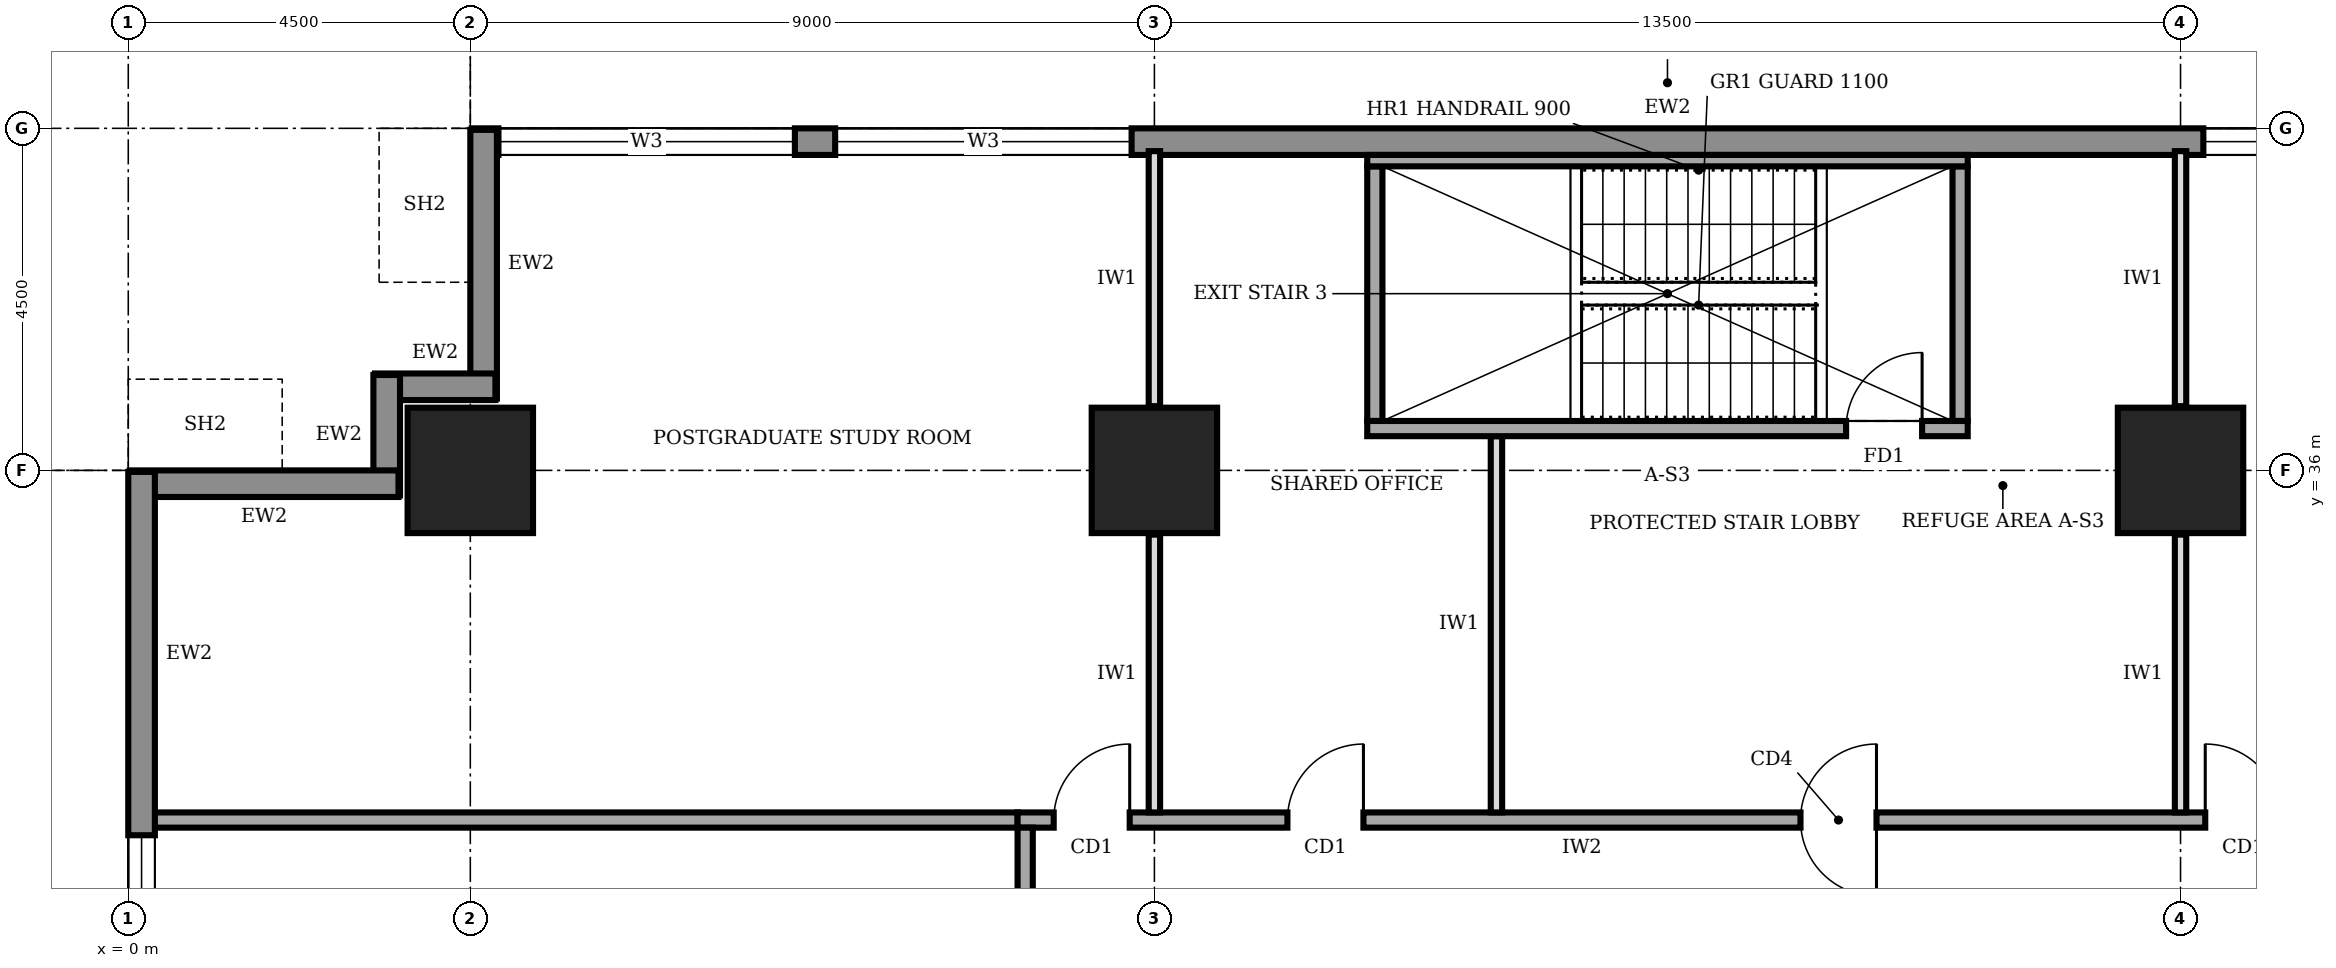
"""IFC4 building model, lengths in metres.
Left out: names, types, materials, properties, quantities, classifications, styles, units other than length and angle.
Written with IfcOpenShell. Run it as: python <this file> out.ifc"""

import sys

from ifc_helpers import new_model, si_unit, direction, frame, frame_2d, origin, origin_2d, place, context, subcontext, project, spatial, rectangle, extrude, element, fill, save


model = new_model("IFC4")
c1 = context("Model", 3, precision=1e-05, world=origin(), true_north=direction((0.0, 1.0)))
c2 = subcontext(c1, "Body", "Model", "MODEL_VIEW")
j1 = project(units=[si_unit("LENGTHUNIT", "METRE"), si_unit("PLANEANGLEUNIT", "RADIAN")], contexts=[c1])
p1 = place(None, origin())
s1 = spatial("IfcSite", under=j1, at=p1, CompositionType="ELEMENT")
p2 = place(p1, origin())
s2 = spatial("IfcBuilding", under=s1, at=p2, CompositionType="ELEMENT")
p3 = place(p2, frame((0.0, 0.0, 181.0)))
s3 = spatial("IfcBuildingStorey", under=s2, at=p3, CompositionType="ELEMENT", Elevation=181.0)
for number, where, z_axis, x_axis in (
    (1, (4.5, 36.0, 0.0), (0.0, 0.0, 1.0), (1.0, 0.0, 0.0)),
    (2, (13.5, 36.0, 0.0), (0.0, 0.0, 1.0), (1.0, 0.0, 0.0)),
    (3, (27.0, 36.0, 0.0), (0.0, 0.0, 1.0), (1.0, 0.0, 0.0)),
):
    element("IfcColumn", number, at=place(p3, frame(where, z_axis=z_axis, x_axis=x_axis)), inside=s3, PredefinedType="COLUMN", context=c2, shape_type="SweptSolid", body=[
        extrude(rectangle(XDim=1.65, YDim=1.65, at=origin_2d()), origin(), (0.0, 0.0, 1.0), 4.0),
    ])
p4 = place(p3, frame((35.98, 40.325, 0.0), z_axis=(0.0, 0.0, 1.0), x_axis=(-1.0, 0.0, 0.0)))
e4 = element("IfcWall", 4, at=p4, inside=s3, PredefinedType="STANDARD", context=c2, shape_type="SweptSolid", body=[
    extrude(rectangle(XDim=31.46, YDim=0.35, at=frame_2d((15.73, 0.0))), origin(), (0.0, 0.0, 1.0), 3.75),
])
p5 = place(p4, frame((27.21, 0.0, 0.95)))
e5 = element("IfcOpeningElement", 5, at=p5, cuts=e4, PredefinedType="OPENING", context=c2, shape_type="SweptSolid", body=[
    extrude(rectangle(XDim=3.9, YDim=1.8, at=frame_2d((1.95, 0.9))), frame((0.0, 0.185, 0.0), z_axis=(0.0, -1.0, 0.0), x_axis=(1.0, 0.0, 0.0)), (0.0, 0.0, 1.0), 0.37),
])
p6 = place(p4, frame((22.78, 0.0, 0.95)))
e6 = element("IfcOpeningElement", 6, at=p6, cuts=e4, PredefinedType="OPENING", context=c2, shape_type="SweptSolid", body=[
    extrude(rectangle(XDim=3.9, YDim=1.8, at=frame_2d((1.95, 0.9))), frame((0.0, 0.185, 0.0), z_axis=(0.0, -1.0, 0.0), x_axis=(1.0, 0.0, 0.0)), (0.0, 0.0, 1.0), 0.37),
])
p7 = place(p4, frame((4.78, 0.0, 0.95)))
e7 = element("IfcOpeningElement", 7, at=p7, cuts=e4, PredefinedType="OPENING", context=c2, shape_type="SweptSolid", body=[
    extrude(rectangle(XDim=3.9, YDim=1.8, at=frame_2d((1.95, 0.9))), frame((0.0, 0.185, 0.0), z_axis=(0.0, -1.0, 0.0), x_axis=(1.0, 0.0, 0.0)), (0.0, 0.0, 1.0), 0.37),
])
p8 = place(p3, frame((4.675, 40.48, 0.0), z_axis=(0.0, 0.0, 1.0), x_axis=(0.0, -1.0, 0.0)))
e8 = element("IfcWall", 8, at=p8, inside=s3, PredefinedType="STANDARD", context=c2, shape_type="SweptSolid", body=[
    extrude(rectangle(XDim=3.535, YDim=0.35, at=frame_2d((1.768, 0.0))), origin(), (0.0, 0.0, 1.0), 2.85),
])
for number, where, z_axis, x_axis in (
    (9, (4.83, 37.1, 0.0), (0.0, 0.0, 1.0), (-1.0, 0.0, 0.0)),
    (10, (3.4, 37.255, 0.0), (0.0, 0.0, 1.0), (0.0, -1.0, 0.0)),
):
    element("IfcWall", number, at=place(p3, frame(where, z_axis=z_axis, x_axis=x_axis)), inside=s3, PredefinedType="STANDARD", context=c2, shape_type="SweptSolid", body=[
        extrude(rectangle(XDim=1.585, YDim=0.35, at=frame_2d((0.792, 0.0))), origin(), (0.0, 0.0, 1.0), 3.75),
    ])
p9 = place(p3, frame((3.555, 35.825, 0.0), z_axis=(0.0, 0.0, 1.0), x_axis=(-1.0, 0.0, 0.0)))
e11 = element("IfcWall", 11, at=p9, inside=s3, PredefinedType="STANDARD", context=c2, shape_type="SweptSolid", body=[
    extrude(rectangle(XDim=3.535, YDim=0.35, at=frame_2d((1.768, 0.0))), origin(), (0.0, 0.0, 1.0), 2.85),
])
p10 = place(p3, frame((0.175, 35.98, 0.0), z_axis=(0.0, 0.0, 1.0), x_axis=(0.0, -1.0, 0.0)))
e12 = element("IfcWall", 12, at=p10, inside=s3, PredefinedType="STANDARD", context=c2, shape_type="SweptSolid", body=[
    extrude(rectangle(XDim=31.46, YDim=0.35, at=frame_2d((15.73, 0.0))), origin(), (0.0, 0.0, 1.0), 3.75),
])
p11 = place(p10, frame((27.21, 0.0, 0.95)))
e13 = element("IfcOpeningElement", 13, at=p11, cuts=e12, PredefinedType="OPENING", context=c2, shape_type="SweptSolid", body=[
    extrude(rectangle(XDim=3.9, YDim=1.8, at=frame_2d((1.95, 0.9))), frame((0.0, 0.185, 0.0), z_axis=(0.0, -1.0, 0.0), x_axis=(1.0, 0.0, 0.0)), (0.0, 0.0, 1.0), 0.37),
])
p12 = place(p10, frame((22.78, 0.0, 0.95)))
e14 = element("IfcOpeningElement", 14, at=p12, cuts=e12, PredefinedType="OPENING", context=c2, shape_type="SweptSolid", body=[
    extrude(rectangle(XDim=3.9, YDim=1.8, at=frame_2d((1.95, 0.9))), frame((0.0, 0.185, 0.0), z_axis=(0.0, -1.0, 0.0), x_axis=(1.0, 0.0, 0.0)), (0.0, 0.0, 1.0), 0.37),
])
p13 = place(p10, frame((18.28, 0.0, 0.95)))
e15 = element("IfcOpeningElement", 15, at=p13, cuts=e12, PredefinedType="OPENING", context=c2, shape_type="SweptSolid", body=[
    extrude(rectangle(XDim=3.9, YDim=1.8, at=frame_2d((1.95, 0.9))), frame((0.0, 0.185, 0.0), z_axis=(0.0, -1.0, 0.0), x_axis=(1.0, 0.0, 0.0)), (0.0, 0.0, 1.0), 0.37),
])
p14 = place(p10, frame((13.78, 0.0, 0.95)))
e16 = element("IfcOpeningElement", 16, at=p14, cuts=e12, PredefinedType="OPENING", context=c2, shape_type="SweptSolid", body=[
    extrude(rectangle(XDim=3.9, YDim=1.8, at=frame_2d((1.95, 0.9))), frame((0.0, 0.185, 0.0), z_axis=(0.0, -1.0, 0.0), x_axis=(1.0, 0.0, 0.0)), (0.0, 0.0, 1.0), 0.37),
])
p15 = place(p10, frame((9.28, 0.0, 0.95)))
e17 = element("IfcOpeningElement", 17, at=p15, cuts=e12, PredefinedType="OPENING", context=c2, shape_type="SweptSolid", body=[
    extrude(rectangle(XDim=3.9, YDim=1.8, at=frame_2d((1.95, 0.9))), frame((0.0, 0.185, 0.0), z_axis=(0.0, -1.0, 0.0), x_axis=(1.0, 0.0, 0.0)), (0.0, 0.0, 1.0), 0.37),
])
p16 = place(p10, frame((4.78, 0.0, 0.95)))
e18 = element("IfcOpeningElement", 18, at=p16, cuts=e12, PredefinedType="OPENING", context=c2, shape_type="SweptSolid", body=[
    extrude(rectangle(XDim=3.9, YDim=1.8, at=frame_2d((1.95, 0.9))), frame((0.0, 0.185, 0.0), z_axis=(0.0, -1.0, 0.0), x_axis=(1.0, 0.0, 0.0)), (0.0, 0.0, 1.0), 0.37),
])
p17 = place(p3, frame((28.6, 31.4, 0.0), z_axis=(0.0, 0.0, 1.0), x_axis=(-1.0, 0.0, 0.0)))
e19 = element("IfcWall", 19, at=p17, inside=s3, PredefinedType="SOLIDWALL", context=c2, shape_type="SweptSolid", body=[
    extrude(rectangle(XDim=16.9, YDim=0.2, at=frame_2d((8.45, 0.0))), origin(), (0.0, 0.0, 1.0), 3.75),
])
p18 = place(p17, frame((15.425, 0.0, 0.0)))
e20 = element("IfcOpeningElement", 20, at=p18, cuts=e19, PredefinedType="OPENING", context=c2, shape_type="SweptSolid", body=[
    extrude(rectangle(XDim=1.0, YDim=2.1, at=frame_2d((0.5, 1.05))), frame((0.0, 0.11, 0.0), z_axis=(0.0, -1.0, 0.0), x_axis=(1.0, 0.0, 0.0)), (0.0, 0.0, 1.0), 0.22),
])
p19 = place(p17, frame((12.35, 0.0, 0.0)))
e21 = element("IfcOpeningElement", 21, at=p19, cuts=e19, PredefinedType="OPENING", context=c2, shape_type="SweptSolid", body=[
    extrude(rectangle(XDim=1.0, YDim=2.1, at=frame_2d((0.5, 1.05))), frame((0.0, 0.11, 0.0), z_axis=(0.0, -1.0, 0.0), x_axis=(1.0, 0.0, 0.0)), (0.0, 0.0, 1.0), 0.22),
])
p20 = place(p17, frame((5.6, 0.0, 0.0)))
e22 = element("IfcOpeningElement", 22, at=p20, cuts=e19, PredefinedType="OPENING", context=c2, shape_type="SweptSolid", body=[
    extrude(rectangle(XDim=1.0, YDim=2.1, at=frame_2d((0.5, 1.05))), frame((0.0, 0.11, 0.0), z_axis=(0.0, -1.0, 0.0), x_axis=(1.0, 0.0, 0.0)), (0.0, 0.0, 1.0), 0.22),
])
p21 = place(p17, frame((0.275, 0.0, 0.0)))
e23 = element("IfcOpeningElement", 23, at=p21, cuts=e19, PredefinedType="OPENING", context=c2, shape_type="SweptSolid", body=[
    extrude(rectangle(XDim=1.0, YDim=2.1, at=frame_2d((0.5, 1.05))), frame((0.0, 0.11, 0.0), z_axis=(0.0, -1.0, 0.0), x_axis=(1.0, 0.0, 0.0)), (0.0, 0.0, 1.0), 0.22),
])
p22 = place(p3, frame((11.8, 31.3, 0.0), z_axis=(0.0, 0.0, 1.0), x_axis=(0.0, -1.0, 0.0)))
e24 = element("IfcWall", 24, at=p22, inside=s3, PredefinedType="SOLIDWALL", context=c2, shape_type="SweptSolid", body=[
    extrude(rectangle(XDim=22.3, YDim=0.2, at=frame_2d((11.15, 0.0))), origin(), (0.0, 0.0, 1.0), 3.75),
])
p23 = place(p22, frame((19.55, 0.0, 0.0)))
e25 = element("IfcOpeningElement", 25, at=p23, cuts=e24, PredefinedType="OPENING", context=c2, shape_type="SweptSolid", body=[
    extrude(rectangle(XDim=1.0, YDim=2.1, at=frame_2d((0.5, 1.05))), frame((0.0, 0.11, 0.0), z_axis=(0.0, -1.0, 0.0), x_axis=(1.0, 0.0, 0.0)), (0.0, 0.0, 1.0), 0.22),
])
p24 = place(p22, frame((16.15, 0.0, 0.0)))
e26 = element("IfcOpeningElement", 26, at=p24, cuts=e24, PredefinedType="OPENING", context=c2, shape_type="SweptSolid", body=[
    extrude(rectangle(XDim=0.9, YDim=2.1, at=frame_2d((0.45, 1.05))), frame((0.0, 0.11, 0.0), z_axis=(0.0, -1.0, 0.0), x_axis=(1.0, 0.0, 0.0)), (0.0, 0.0, 1.0), 0.22),
])
p25 = place(p22, frame((12.95, 0.0, 0.0)))
e27 = element("IfcOpeningElement", 27, at=p25, cuts=e24, PredefinedType="OPENING", context=c2, shape_type="SweptSolid", body=[
    extrude(rectangle(XDim=0.9, YDim=2.1, at=frame_2d((0.45, 1.05))), frame((0.0, 0.11, 0.0), z_axis=(0.0, -1.0, 0.0), x_axis=(1.0, 0.0, 0.0)), (0.0, 0.0, 1.0), 0.22),
])
p26 = place(p22, frame((7.4, 0.0, 0.0)))
e28 = element("IfcOpeningElement", 28, at=p26, cuts=e24, PredefinedType="OPENING", context=c2, shape_type="SweptSolid", body=[
    extrude(rectangle(XDim=0.9, YDim=2.1, at=frame_2d((0.45, 1.05))), frame((0.0, 0.11, 0.0), z_axis=(0.0, -1.0, 0.0), x_axis=(1.0, 0.0, 0.0)), (0.0, 0.0, 1.0), 0.22),
])
p27 = place(p22, frame((4.8, 0.0, 0.0)))
e29 = element("IfcOpeningElement", 29, at=p27, cuts=e24, PredefinedType="OPENING", context=c2, shape_type="SweptSolid", body=[
    extrude(rectangle(XDim=1.0, YDim=2.1, at=frame_2d((0.5, 1.05))), frame((0.0, 0.11, 0.0), z_axis=(0.0, -1.0, 0.0), x_axis=(1.0, 0.0, 0.0)), (0.0, 0.0, 1.0), 0.22),
])
p28 = place(p22, frame((9.9, 0.0, 0.0)))
e30 = element("IfcOpeningElement", 30, at=p28, cuts=e24, PredefinedType="OPENING", context=c2, shape_type="SweptSolid", body=[
    extrude(rectangle(XDim=1.0, YDim=2.1, at=frame_2d((0.5, 1.05))), frame((0.0, 0.11, 0.0), z_axis=(0.0, -1.0, 0.0), x_axis=(1.0, 0.0, 0.0)), (0.0, 0.0, 1.0), 0.22),
])
p29 = place(p22, frame((1.55, 0.0, 0.0)))
e31 = element("IfcOpeningElement", 31, at=p29, cuts=e24, PredefinedType="OPENING", context=c2, shape_type="SweptSolid", body=[
    extrude(rectangle(XDim=1.0, YDim=2.1, at=frame_2d((0.5, 1.05))), frame((0.0, 0.11, 0.0), z_axis=(0.0, -1.0, 0.0), x_axis=(1.0, 0.0, 0.0)), (0.0, 0.0, 1.0), 0.22),
])
p30 = place(p3, frame((0.3, 31.4, 0.0), z_axis=(0.0, 0.0, 1.0), x_axis=(1.0, 0.0, 0.0)))
e32 = element("IfcWall", 32, at=p30, inside=s3, PredefinedType="SOLIDWALL", context=c2, shape_type="SweptSolid", body=[
    extrude(rectangle(XDim=11.4, YDim=0.2, at=frame_2d((5.7, 0.0))), origin(), (0.0, 0.0, 1.0), 3.75),
])
p31 = place(p3, frame((13.5, 31.5, 0.0), z_axis=(0.0, 0.0, 1.0), x_axis=(0.0, 1.0, 0.0)))
e33 = element("IfcWall", 33, at=p31, inside=s3, PredefinedType="PARTITIONING", context=c2, shape_type="SweptSolid", body=[
    extrude(rectangle(XDim=3.655, YDim=0.15, at=frame_2d((1.828, 0.0))), origin(), (0.0, 0.0, 1.0), 2.85),
])
p32 = place(p3, frame((13.5, 36.845, 0.0), z_axis=(0.0, 0.0, 1.0), x_axis=(0.0, 1.0, 0.0)))
e34 = element("IfcWall", 34, at=p32, inside=s3, PredefinedType="PARTITIONING", context=c2, shape_type="SweptSolid", body=[
    extrude(rectangle(XDim=3.355, YDim=0.15, at=frame_2d((1.677, 0.0))), origin(), (0.0, 0.0, 1.0), 2.85),
])
p33 = place(p3, frame((18.0, 31.5, 0.0), z_axis=(0.0, 0.0, 1.0), x_axis=(0.0, 1.0, 0.0)))
e35 = element("IfcWall", 35, at=p33, inside=s3, PredefinedType="PARTITIONING", context=c2, shape_type="SweptSolid", body=[
    extrude(rectangle(XDim=4.95, YDim=0.15, at=frame_2d((2.475, 0.0))), origin(), (0.0, 0.0, 1.0), 3.75),
])
p34 = place(p3, frame((27.0, 31.5, 0.0), z_axis=(0.0, 0.0, 1.0), x_axis=(0.0, 1.0, 0.0)))
e36 = element("IfcWall", 36, at=p34, inside=s3, PredefinedType="PARTITIONING", context=c2, shape_type="SweptSolid", body=[
    extrude(rectangle(XDim=3.655, YDim=0.15, at=frame_2d((1.828, 0.0))), origin(), (0.0, 0.0, 1.0), 2.85),
])
p35 = place(p3, frame((27.0, 36.845, 0.0), z_axis=(0.0, 0.0, 1.0), x_axis=(0.0, 1.0, 0.0)))
e37 = element("IfcWall", 37, at=p35, inside=s3, PredefinedType="PARTITIONING", context=c2, shape_type="SweptSolid", body=[
    extrude(rectangle(XDim=3.355, YDim=0.15, at=frame_2d((1.677, 0.0))), origin(), (0.0, 0.0, 1.0), 2.85),
])
p36 = place(p3, frame((16.3, 36.55, 0.0), z_axis=(0.0, 0.0, 1.0), x_axis=(1.0, 0.0, 0.0)))
e38 = element("IfcWall", 38, at=p36, inside=s3, PredefinedType="SOLIDWALL", context=c2, shape_type="SweptSolid", body=[
    extrude(rectangle(XDim=7.9, YDim=0.2, at=frame_2d((3.95, 0.0))), origin(), (0.0, 0.0, 1.0), 3.75),
])
p37 = place(p36, frame((6.3, 0.0, 0.0)))
e39 = element("IfcOpeningElement", 39, at=p37, cuts=e38, PredefinedType="OPENING", context=c2, shape_type="SweptSolid", body=[
    extrude(rectangle(XDim=1.0, YDim=2.1, at=frame_2d((0.5, 1.05))), frame((0.0, 0.11, 0.0), z_axis=(0.0, -1.0, 0.0), x_axis=(1.0, 0.0, 0.0)), (0.0, 0.0, 1.0), 0.22),
])
p38 = place(p3, frame((16.3, 40.075, 0.0), z_axis=(0.0, 0.0, 1.0), x_axis=(1.0, 0.0, 0.0)))
e40 = element("IfcWall", 40, at=p38, inside=s3, PredefinedType="SOLIDWALL", context=c2, shape_type="SweptSolid", body=[
    extrude(rectangle(XDim=7.9, YDim=0.15, at=frame_2d((3.95, 0.0))), origin(), (0.0, 0.0, 1.0), 3.75),
])
for number, where, z_axis, x_axis in (
    (41, (16.4, 36.65, 0.0), (0.0, 0.0, 1.0), (0.0, 1.0, 0.0)),
    (42, (24.1, 36.65, 0.0), (0.0, 0.0, 1.0), (0.0, 1.0, 0.0)),
):
    element("IfcWall", number, at=place(p3, frame(where, z_axis=z_axis, x_axis=x_axis)), inside=s3, PredefinedType="SOLIDWALL", context=c2, shape_type="SweptSolid", body=[
        extrude(rectangle(XDim=3.35, YDim=0.2, at=frame_2d((1.675, 0.0))), origin(), (0.0, 0.0, 1.0), 3.75),
    ])
p39 = place(p5, origin())
e43 = element("IfcWindow", 43, at=p39, inside=s3, PartitioningType="SINGLE_PANEL", PredefinedType="WINDOW", context=c2, shape_type="SweptSolid", body=[
    extrude(rectangle(XDim=3.9, YDim=1.8, at=frame_2d((1.95, 0.9))), frame((0.0, 0.03, 0.0), z_axis=(0.0, -1.0, 0.0), x_axis=(1.0, 0.0, 0.0)), (0.0, 0.0, 1.0), 0.06),
])
fill(e5, e43)
p40 = place(p6, origin())
e44 = element("IfcWindow", 44, at=p40, inside=s3, PartitioningType="SINGLE_PANEL", PredefinedType="WINDOW", context=c2, shape_type="SweptSolid", body=[
    extrude(rectangle(XDim=3.9, YDim=1.8, at=frame_2d((1.95, 0.9))), frame((0.0, 0.03, 0.0), z_axis=(0.0, -1.0, 0.0), x_axis=(1.0, 0.0, 0.0)), (0.0, 0.0, 1.0), 0.06),
])
fill(e6, e44)
p41 = place(p7, origin())
e45 = element("IfcWindow", 45, at=p41, inside=s3, PartitioningType="SINGLE_PANEL", PredefinedType="WINDOW", context=c2, shape_type="SweptSolid", body=[
    extrude(rectangle(XDim=3.9, YDim=1.8, at=frame_2d((1.95, 0.9))), frame((0.0, 0.03, 0.0), z_axis=(0.0, -1.0, 0.0), x_axis=(1.0, 0.0, 0.0)), (0.0, 0.0, 1.0), 0.06),
])
fill(e7, e45)
p42 = place(p16, origin())
e46 = element("IfcWindow", 46, at=p42, inside=s3, PartitioningType="SINGLE_PANEL", PredefinedType="WINDOW", context=c2, shape_type="SweptSolid", body=[
    extrude(rectangle(XDim=3.9, YDim=1.8, at=frame_2d((1.95, 0.9))), frame((0.0, 0.03, 0.0), z_axis=(0.0, -1.0, 0.0), x_axis=(1.0, 0.0, 0.0)), (0.0, 0.0, 1.0), 0.06),
])
fill(e18, e46)
p43 = place(p18, frame((1.0, 0.0, 0.0), z_axis=(0.0, 0.0, 1.0), x_axis=(-1.0, 0.0, 0.0)))
e47 = element("IfcDoor", 47, at=p43, inside=s3, OperationType="SINGLE_SWING_RIGHT", PredefinedType="DOOR", context=c2, shape_type="SweptSolid", body=[
    extrude(rectangle(XDim=1.0, YDim=2.1, at=frame_2d((0.5, 1.05))), frame((0.0, 0.025, 0.0), z_axis=(0.0, -1.0, 0.0), x_axis=(1.0, 0.0, 0.0)), (0.0, 0.0, 1.0), 0.05),
])
fill(e20, e47)
p44 = place(p19, frame((1.0, 0.0, 0.0), z_axis=(0.0, 0.0, 1.0), x_axis=(-1.0, 0.0, 0.0)))
e48 = element("IfcDoor", 48, at=p44, inside=s3, OperationType="SINGLE_SWING_RIGHT", PredefinedType="DOOR", context=c2, shape_type="SweptSolid", body=[
    extrude(rectangle(XDim=1.0, YDim=2.1, at=frame_2d((0.5, 1.05))), frame((0.0, 0.025, 0.0), z_axis=(0.0, -1.0, 0.0), x_axis=(1.0, 0.0, 0.0)), (0.0, 0.0, 1.0), 0.05),
])
fill(e21, e48)
p45 = place(p20, origin())
e49 = element("IfcDoor", 49, at=p45, inside=s3, OperationType="DOUBLE_SWING_LEFT", PredefinedType="DOOR", context=c2, shape_type="SweptSolid", body=[
    extrude(rectangle(XDim=1.0, YDim=2.1, at=frame_2d((0.5, 1.05))), frame((0.0, 0.025, 0.0), z_axis=(0.0, -1.0, 0.0), x_axis=(1.0, 0.0, 0.0)), (0.0, 0.0, 1.0), 0.05),
])
fill(e22, e49)
p46 = place(p21, frame((1.0, 0.0, 0.0), z_axis=(0.0, 0.0, 1.0), x_axis=(-1.0, 0.0, 0.0)))
e50 = element("IfcDoor", 50, at=p46, inside=s3, OperationType="SINGLE_SWING_LEFT", PredefinedType="DOOR", context=c2, shape_type="SweptSolid", body=[
    extrude(rectangle(XDim=1.0, YDim=2.1, at=frame_2d((0.5, 1.05))), frame((0.0, 0.025, 0.0), z_axis=(0.0, -1.0, 0.0), x_axis=(1.0, 0.0, 0.0)), (0.0, 0.0, 1.0), 0.05),
])
fill(e23, e50)
p47 = place(p37, origin())
e51 = element("IfcDoor", 51, at=p47, inside=s3, OperationType="SINGLE_SWING_RIGHT", PredefinedType="DOOR", context=c2, shape_type="SweptSolid", body=[
    extrude(rectangle(XDim=1.0, YDim=2.1, at=frame_2d((0.5, 1.05))), frame((0.0, 0.025, 0.0), z_axis=(0.0, -1.0, 0.0), x_axis=(1.0, 0.0, 0.0)), (0.0, 0.0, 1.0), 0.05),
])
fill(e39, e51)
save(model, sys.argv[1])
